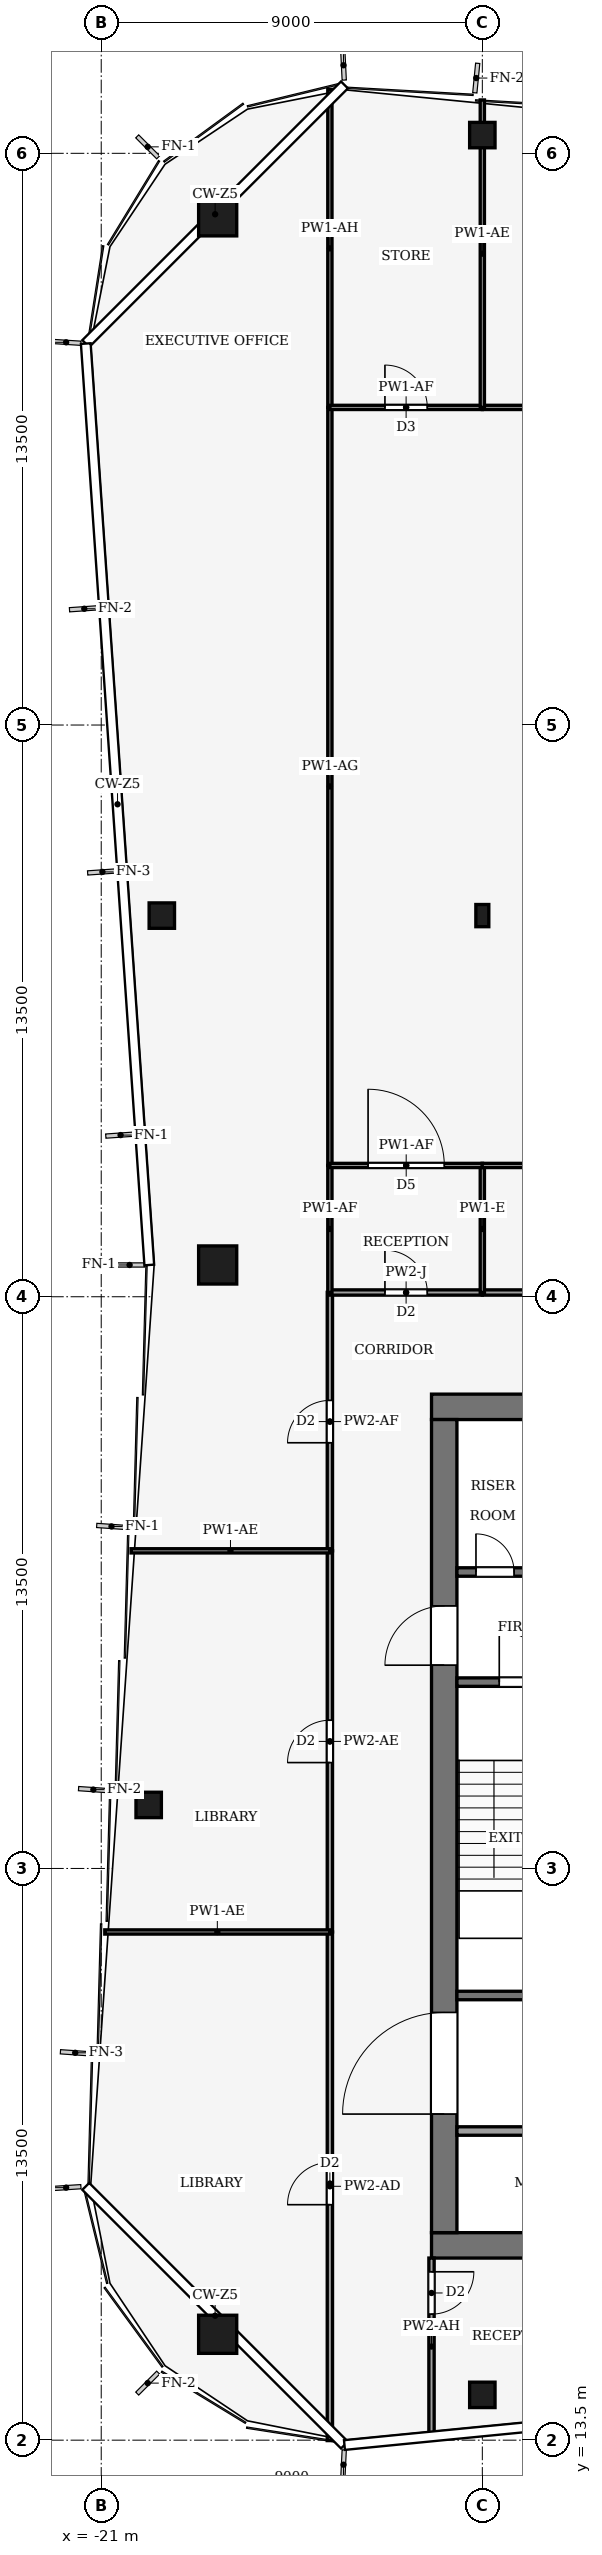
"""IFC4 building model, lengths in metres.
Left out: names, types, materials, properties, quantities, classifications, styles, units other than length and angle.
Written with IfcOpenShell. Run it as: python <this file> out.ifc"""

import sys

from ifc_helpers import new_model, si_unit, direction, frame, frame_2d, origin, origin_2d, place, context, subcontext, project, spatial, rectangle, hollow_rectangle, i_section, extrude, element, fill, save


model = new_model("IFC4")
c1 = context("Model", 3, precision=1e-05, world=origin(), true_north=direction((0.0, 1.0)))
c2 = subcontext(c1, "Body", "Model", "MODEL_VIEW")
j1 = project(units=[si_unit("LENGTHUNIT", "METRE"), si_unit("PLANEANGLEUNIT", "RADIAN")], contexts=[c1])
p1 = place(None, origin())
s1 = spatial("IfcSite", under=j1, at=p1, CompositionType="ELEMENT")
p2 = place(p1, origin())
s2 = spatial("IfcBuilding", under=s1, at=p2, CompositionType="ELEMENT")
p3 = place(p2, frame((0.0, 0.0, 330.0)))
s3 = spatial("IfcBuildingStorey", under=s2, at=p3, CompositionType="ELEMENT", Elevation=330.0)
for number, where, z_axis, x_axis in (
    (1, (-13.2, 18.1, -0.13), (0.0, 0.0, 1.0), (1.0, 0.0, 0.0)),
    (2, (-13.2, 37.9, -0.13), (0.0, 0.0, 1.0), (1.0, 0.0, 0.0)),
):
    element("IfcWall", number, at=place(p3, frame(where, z_axis=z_axis, x_axis=x_axis)), inside=s3, PredefinedType="SHEAR", context=c2, shape_type="SweptSolid", body=[
        extrude(rectangle(XDim=26.4, YDim=0.6, at=frame_2d((13.2, 0.0))), origin(), (0.0, 0.0, 1.0), 3.95),
    ])
p4 = place(p3, frame((-12.9, 18.4, -0.13), z_axis=(0.0, 0.0, 1.0), x_axis=(0.0, 1.0, 0.0)))
e3 = element("IfcWall", 3, at=p4, inside=s3, PredefinedType="SHEAR", context=c2, shape_type="SweptSolid", body=[
    extrude(rectangle(XDim=19.2, YDim=0.6, at=frame_2d((9.6, 0.0))), origin(), (0.0, 0.0, 1.0), 3.95),
])
p5 = place(p4, frame((2.8, 0.0, 0.13)))
e4 = element("IfcOpeningElement", 4, at=p5, cuts=e3, PredefinedType="OPENING", context=c2, shape_type="SweptSolid", body=[
    extrude(rectangle(XDim=2.4, YDim=2.4, at=frame_2d((1.2, 1.2))), frame((0.0, 0.31, 0.0), z_axis=(0.0, -1.0, 0.0), x_axis=(1.0, 0.0, 0.0)), (0.0, 0.0, 1.0), 0.62),
])
p6 = place(p4, frame((13.4, 0.0, 0.13)))
e5 = element("IfcOpeningElement", 5, at=p6, cuts=e3, PredefinedType="OPENING", context=c2, shape_type="SweptSolid", body=[
    extrude(rectangle(XDim=1.4, YDim=2.2, at=frame_2d((0.7, 1.1))), frame((0.0, 0.31, 0.0), z_axis=(0.0, -1.0, 0.0), x_axis=(1.0, 0.0, 0.0)), (0.0, 0.0, 1.0), 0.62),
])
for number, where, z_axis, x_axis in (
    (6, (-18.25, 66.0, 0.0), (0.0, 0.0, 1.0), (1.0, 0.0, 0.0)),
    (7, (-18.25, 16.0, 0.0), (0.0, 0.0, 1.0), (1.0, 0.0, 0.0)),
    (8, (-18.25, 41.25, 0.0), (0.0, 0.0, 1.0), (1.0, 0.0, 0.0)),
):
    element("IfcColumn", number, at=place(p3, frame(where, z_axis=z_axis, x_axis=x_axis)), inside=s3, PredefinedType="COLUMN", context=c2, shape_type="SweptSolid", body=[
        extrude(hollow_rectangle(XDim=0.9, YDim=0.9, WallThickness=0.04, at=origin_2d()), origin(), (0.0, 0.0, 1.0), 4.0),
    ])
for number, where, z_axis, x_axis in (
    (9, (-12.0, 67.93, 0.0), (0.0, 0.0, 1.0), (1.0, 0.0, 0.0)),
    (10, (-12.0, 14.57, 0.0), (0.0, 0.0, 1.0), (1.0, 0.0, 0.0)),
    (11, (-19.879, 28.5, 0.0), (0.0, 0.0, 1.0), (1.0, 0.0, 0.0)),
    (12, (-19.569, 49.5, 0.0), (0.0, 0.0, 1.0), (1.0, 0.0, 0.0)),
):
    element("IfcColumn", number, at=place(p3, frame(where, z_axis=z_axis, x_axis=x_axis)), inside=s3, PredefinedType="COLUMN", context=c2, shape_type="SweptSolid", body=[
        extrude(hollow_rectangle(XDim=0.6, YDim=0.6, WallThickness=0.025, at=origin_2d()), origin(), (0.0, 0.0, 1.0), 4.0),
    ])
p7 = place(p3, frame((-12.0, 49.5, 0.0), z_axis=(0.0, 0.0, 1.0), x_axis=(1.0, 0.0, 0.0)))
e13 = element("IfcColumn", 13, at=p7, inside=s3, PredefinedType="COLUMN", context=c2, shape_type="SweptSolid", body=[
    extrude(i_section(OverallWidth=0.306, OverallDepth=0.524, WebThickness=0.012, FlangeThickness=0.04, FilletRadius=0.027, at=origin_2d()), origin(), (0.0, 0.0, 1.0), 4.0),
])
p8 = place(p3, frame((-12.6, 20.8, 0.0), z_axis=(0.0, 0.0, 1.0), x_axis=(1.0, 0.0, 0.0)))
e14 = element("IfcWall", 14, at=p8, inside=s3, PredefinedType="PARTITIONING", context=c2, shape_type="SweptSolid", body=[
    extrude(rectangle(XDim=6.6, YDim=0.2, at=frame_2d((3.3, 0.0))), origin(), (0.0, 0.0, 1.0), 3.82),
])
p9 = place(p8, frame((1.81, 0.0, 0.0)))
e15 = element("IfcOpeningElement", 15, at=p9, cuts=e14, PredefinedType="OPENING", context=c2, shape_type="SweptSolid", body=[
    extrude(rectangle(XDim=1.0, YDim=2.1, at=frame_2d((0.5, 1.05))), frame((0.0, 0.11, 0.0), z_axis=(0.0, -1.0, 0.0), x_axis=(1.0, 0.0, 0.0)), (0.0, 0.0, 1.0), 0.22),
])
p10 = place(p8, frame((5.11, 0.0, 0.0)))
e16 = element("IfcOpeningElement", 16, at=p10, cuts=e14, PredefinedType="OPENING", context=c2, shape_type="SweptSolid", body=[
    extrude(rectangle(XDim=1.0, YDim=2.1, at=frame_2d((0.5, 1.05))), frame((0.0, 0.11, 0.0), z_axis=(0.0, -1.0, 0.0), x_axis=(1.0, 0.0, 0.0)), (0.0, 0.0, 1.0), 0.22),
])
p11 = place(p3, frame((-12.6, 24.0, 0.0), z_axis=(0.0, 0.0, 1.0), x_axis=(1.0, 0.0, 0.0)))
e17 = element("IfcWall", 17, at=p11, inside=s3, PredefinedType="PARTITIONING", context=c2, shape_type="SweptSolid", body=[
    extrude(rectangle(XDim=6.6, YDim=0.2, at=frame_2d((3.3, 0.0))), origin(), (0.0, 0.0, 1.0), 3.82),
])
p12 = place(p11, frame((4.07, 0.0, 0.0)))
e18 = element("IfcOpeningElement", 18, at=p12, cuts=e17, PredefinedType="OPENING", context=c2, shape_type="SweptSolid", body=[
    extrude(rectangle(XDim=1.0, YDim=2.1, at=frame_2d((0.5, 1.05))), frame((0.0, 0.11, 0.0), z_axis=(0.0, -1.0, 0.0), x_axis=(1.0, 0.0, 0.0)), (0.0, 0.0, 1.0), 0.22),
])
p13 = place(p11, frame((5.57, 0.0, 0.0)))
e19 = element("IfcOpeningElement", 19, at=p13, cuts=e17, PredefinedType="OPENING", context=c2, shape_type="SweptSolid", body=[
    extrude(rectangle(XDim=0.8, YDim=2.1, at=frame_2d((0.4, 1.05))), frame((0.0, 0.11, 0.0), z_axis=(0.0, -1.0, 0.0), x_axis=(1.0, 0.0, 0.0)), (0.0, 0.0, 1.0), 0.22),
])
p14 = place(p3, frame((-12.6, 31.4, 0.0), z_axis=(0.0, 0.0, 1.0), x_axis=(1.0, 0.0, 0.0)))
e20 = element("IfcWall", 20, at=p14, inside=s3, PredefinedType="PARTITIONING", context=c2, shape_type="SweptSolid", body=[
    extrude(rectangle(XDim=6.6, YDim=0.2, at=frame_2d((3.3, 0.0))), origin(), (0.0, 0.0, 1.0), 3.82),
])
p15 = place(p14, frame((1.0, 0.0, 0.0)))
e21 = element("IfcOpeningElement", 21, at=p15, cuts=e20, PredefinedType="OPENING", context=c2, shape_type="SweptSolid", body=[
    extrude(rectangle(XDim=1.2, YDim=2.2, at=frame_2d((0.6, 1.1))), frame((0.0, 0.11, 0.0), z_axis=(0.0, -1.0, 0.0), x_axis=(1.0, 0.0, 0.0)), (0.0, 0.0, 1.0), 0.22),
])
p16 = place(p3, frame((-12.6, 34.0, 0.0), z_axis=(0.0, 0.0, 1.0), x_axis=(1.0, 0.0, 0.0)))
e22 = element("IfcWall", 22, at=p16, inside=s3, PredefinedType="PARTITIONING", context=c2, shape_type="SweptSolid", body=[
    extrude(rectangle(XDim=6.6, YDim=0.2, at=frame_2d((3.3, 0.0))), origin(), (0.0, 0.0, 1.0), 3.82),
])
p17 = place(p16, frame((4.7, 0.0, 0.0)))
e23 = element("IfcOpeningElement", 23, at=p17, cuts=e22, PredefinedType="OPENING", context=c2, shape_type="SweptSolid", body=[
    extrude(rectangle(XDim=1.4, YDim=2.2, at=frame_2d((0.7, 1.1))), frame((0.0, 0.11, 0.0), z_axis=(0.0, -1.0, 0.0), x_axis=(1.0, 0.0, 0.0)), (0.0, 0.0, 1.0), 0.22),
])
p18 = place(p16, frame((2.3, 0.0, 0.0)))
e24 = element("IfcOpeningElement", 24, at=p18, cuts=e22, PredefinedType="OPENING", context=c2, shape_type="SweptSolid", body=[
    extrude(rectangle(XDim=1.4, YDim=2.2, at=frame_2d((0.7, 1.1))), frame((0.0, 0.11, 0.0), z_axis=(0.0, -1.0, 0.0), x_axis=(1.0, 0.0, 0.0)), (0.0, 0.0, 1.0), 0.22),
])
p19 = place(p16, frame((0.45, 0.0, 0.0)))
e25 = element("IfcOpeningElement", 25, at=p19, cuts=e22, PredefinedType="OPENING", context=c2, shape_type="SweptSolid", body=[
    extrude(rectangle(XDim=0.9, YDim=2.1, at=frame_2d((0.45, 1.05))), frame((0.0, 0.11, 0.0), z_axis=(0.0, -1.0, 0.0), x_axis=(1.0, 0.0, 0.0)), (0.0, 0.0, 1.0), 0.22),
])
p20 = place(p3, frame((-15.6, 13.49, 0.0), z_axis=(0.0, 0.0, 1.0), x_axis=(0.0, 1.0, 0.0)))
e26 = element("IfcWall", 26, at=p20, inside=s3, PredefinedType="PARTITIONING", context=c2, shape_type="SweptSolid", body=[
    extrude(rectangle(XDim=12.01, YDim=0.125, at=frame_2d((6.005, 0.0))), origin(), (0.0, 0.0, 1.0), 2.88),
])
p21 = place(p20, frame((5.571, 0.0, 0.0)))
e27 = element("IfcOpeningElement", 27, at=p21, cuts=e26, PredefinedType="OPENING", context=c2, shape_type="SweptSolid", body=[
    extrude(rectangle(XDim=1.0, YDim=2.1, at=frame_2d((0.5, 1.05))), frame((0.0, 0.073, 0.0), z_axis=(0.0, -1.0, 0.0), x_axis=(1.0, 0.0, 0.0)), (0.0, 0.0, 1.0), 0.145),
])
p22 = place(p3, frame((-15.6, 25.5, 0.0), z_axis=(0.0, 0.0, 1.0), x_axis=(0.0, 1.0, 0.0)))
e28 = element("IfcWall", 28, at=p22, inside=s3, PredefinedType="PARTITIONING", context=c2, shape_type="SweptSolid", body=[
    extrude(rectangle(XDim=9.0, YDim=0.125, at=frame_2d((4.5, 0.0))), origin(), (0.0, 0.0, 1.0), 3.49),
])
p23 = place(p22, frame((4.0, 0.0, 0.0)))
e29 = element("IfcOpeningElement", 29, at=p23, cuts=e28, PredefinedType="OPENING", context=c2, shape_type="SweptSolid", body=[
    extrude(rectangle(XDim=1.0, YDim=2.1, at=frame_2d((0.5, 1.05))), frame((0.0, 0.073, 0.0), z_axis=(0.0, -1.0, 0.0), x_axis=(1.0, 0.0, 0.0)), (0.0, 0.0, 1.0), 0.145),
])
p24 = place(p3, frame((-15.6, 34.5, 0.0), z_axis=(0.0, 0.0, 1.0), x_axis=(0.0, 1.0, 0.0)))
e30 = element("IfcWall", 30, at=p24, inside=s3, PredefinedType="PARTITIONING", context=c2, shape_type="SweptSolid", body=[
    extrude(rectangle(XDim=6.104, YDim=0.125, at=frame_2d((3.052, 0.0))), origin(), (0.0, 0.0, 1.0), 3.09),
])
p25 = place(p24, frame((2.552, 0.0, 0.0)))
e31 = element("IfcOpeningElement", 31, at=p25, cuts=e30, PredefinedType="OPENING", context=c2, shape_type="SweptSolid", body=[
    extrude(rectangle(XDim=1.0, YDim=2.1, at=frame_2d((0.5, 1.05))), frame((0.0, 0.073, 0.0), z_axis=(0.0, -1.0, 0.0), x_axis=(1.0, 0.0, 0.0)), (0.0, 0.0, 1.0), 0.145),
])
p26 = place(p3, frame((-13.2, 17.8, 0.0), z_axis=(0.0, 0.0, 1.0), x_axis=(0.0, -1.0, 0.0)))
e32 = element("IfcWall", 32, at=p26, inside=s3, PredefinedType="PARTITIONING", context=c2, shape_type="SweptSolid", body=[
    extrude(rectangle(XDim=4.178, YDim=0.125, at=frame_2d((2.089, 0.0))), origin(), (0.0, 0.0, 1.0), 2.99),
])
p27 = place(p26, frame((0.324, 0.0, 0.0)))
e33 = element("IfcOpeningElement", 33, at=p27, cuts=e32, PredefinedType="OPENING", context=c2, shape_type="SweptSolid", body=[
    extrude(rectangle(XDim=1.0, YDim=2.1, at=frame_2d((0.5, 1.05))), frame((0.0, 0.073, 0.0), z_axis=(0.0, -1.0, 0.0), x_axis=(1.0, 0.0, 0.0)), (0.0, 0.0, 1.0), 0.145),
])
p28 = place(p3, frame((-15.6, 40.6, 0.0), z_axis=(0.0, 0.0, 1.0), x_axis=(1.0, 0.0, 0.0)))
e34 = element("IfcWall", 34, at=p28, inside=s3, PredefinedType="PARTITIONING", context=c2, shape_type="SweptSolid", body=[
    extrude(rectangle(XDim=3.6, YDim=0.125, at=frame_2d((1.8, 0.0))), origin(), (0.0, 0.0, 1.0), 3.34),
])
p29 = place(p28, frame((1.3, 0.0, 0.0)))
e35 = element("IfcOpeningElement", 35, at=p29, cuts=e34, PredefinedType="OPENING", context=c2, shape_type="SweptSolid", body=[
    extrude(rectangle(XDim=1.0, YDim=2.1, at=frame_2d((0.5, 1.05))), frame((0.0, 0.073, 0.0), z_axis=(0.0, -1.0, 0.0), x_axis=(1.0, 0.0, 0.0)), (0.0, 0.0, 1.0), 0.145),
])
p30 = place(p3, frame((-12.0, 40.6, 0.0), z_axis=(0.0, 0.0, 1.0), x_axis=(1.0, 0.0, 0.0)))
e36 = element("IfcWall", 36, at=p30, inside=s3, PredefinedType="PARTITIONING", context=c2, shape_type="SweptSolid", body=[
    extrude(rectangle(XDim=9.0, YDim=0.125, at=frame_2d((4.5, 0.0))), origin(), (0.0, 0.0, 1.0), 3.34),
])
p31 = place(p30, frame((4.0, 0.0, 0.0)))
e37 = element("IfcOpeningElement", 37, at=p31, cuts=e36, PredefinedType="OPENING", context=c2, shape_type="SweptSolid", body=[
    extrude(rectangle(XDim=1.0, YDim=2.1, at=frame_2d((0.5, 1.05))), frame((0.0, 0.073, 0.0), z_axis=(0.0, -1.0, 0.0), x_axis=(1.0, 0.0, 0.0)), (0.0, 0.0, 1.0), 0.145),
])
p32 = place(p3, frame((-15.6, 25.5, 0.0), z_axis=(0.0, 0.0, 1.0), x_axis=(-1.0, 0.0, 0.0)))
e38 = element("IfcWall", 38, at=p32, inside=s3, PredefinedType="PARTITIONING", context=c2, shape_type="SweptSolid", body=[
    extrude(rectangle(XDim=5.316, YDim=0.1, at=frame_2d((2.658, 0.0))), origin(), (0.0, 0.0, 1.0), 2.99),
])
p33 = place(p3, frame((-15.6, 34.5, 0.0), z_axis=(0.0, 0.0, 1.0), x_axis=(-1.0, 0.0, 0.0)))
e39 = element("IfcWall", 39, at=p33, inside=s3, PredefinedType="PARTITIONING", context=c2, shape_type="SweptSolid", body=[
    extrude(rectangle(XDim=4.695, YDim=0.1, at=frame_2d((2.348, 0.0))), origin(), (0.0, 0.0, 1.0), 2.99),
])
p34 = place(p3, frame((-15.6, 40.6, 0.0), z_axis=(0.0, 0.0, 1.0), x_axis=(0.0, 1.0, 0.0)))
e40 = element("IfcWall", 40, at=p34, inside=s3, PredefinedType="PARTITIONING", context=c2, shape_type="SweptSolid", body=[
    extrude(rectangle(XDim=3.0, YDim=0.1, at=frame_2d((1.5, 0.0))), origin(), (0.0, 0.0, 1.0), 3.82),
])
p35 = place(p3, frame((-15.6, 43.6, 0.0), z_axis=(0.0, 0.0, 1.0), x_axis=(0.0, 1.0, 0.0)))
e41 = element("IfcWall", 41, at=p35, inside=s3, PredefinedType="PARTITIONING", context=c2, shape_type="SweptSolid", body=[
    extrude(rectangle(XDim=17.9, YDim=0.1, at=frame_2d((8.95, 0.0))), origin(), (0.0, 0.0, 1.0), 3.3),
])
p36 = place(p3, frame((-15.6, 61.5, 0.0), z_axis=(0.0, 0.0, 1.0), x_axis=(0.0, 1.0, 0.0)))
e42 = element("IfcWall", 42, at=p36, inside=s3, PredefinedType="PARTITIONING", context=c2, shape_type="SweptSolid", body=[
    extrude(rectangle(XDim=7.51, YDim=0.1, at=frame_2d((3.755, 0.0))), origin(), (0.0, 0.0, 1.0), 2.88),
])
p37 = place(p3, frame((-12.0, 40.6, 0.0), z_axis=(0.0, 0.0, 1.0), x_axis=(0.0, 1.0, 0.0)))
e43 = element("IfcWall", 43, at=p37, inside=s3, PredefinedType="PARTITIONING", context=c2, shape_type="SweptSolid", body=[
    extrude(rectangle(XDim=3.0, YDim=0.1, at=frame_2d((1.5, 0.0))), origin(), (0.0, 0.0, 1.0), 3.34),
])
p38 = place(p3, frame((-15.6, 43.6, 0.0), z_axis=(0.0, 0.0, 1.0), x_axis=(1.0, 0.0, 0.0)))
e44 = element("IfcWall", 44, at=p38, inside=s3, PredefinedType="PARTITIONING", context=c2, shape_type="SweptSolid", body=[
    extrude(rectangle(XDim=3.604, YDim=0.1, at=frame_2d((1.802, 0.0))), origin(), (0.0, 0.0, 1.0), 3.82),
])
p39 = place(p38, frame((0.902, 0.0, 0.0)))
e45 = element("IfcOpeningElement", 45, at=p39, cuts=e44, PredefinedType="OPENING", context=c2, shape_type="SweptSolid", body=[
    extrude(rectangle(XDim=1.8, YDim=2.1, at=frame_2d((0.9, 1.05))), frame((0.0, 0.06, 0.0), z_axis=(0.0, -1.0, 0.0), x_axis=(1.0, 0.0, 0.0)), (0.0, 0.0, 1.0), 0.12),
])
p40 = place(p3, frame((-2.996, 43.6, 0.0), z_axis=(0.0, 0.0, 1.0), x_axis=(-1.0, 0.0, 0.0)))
e46 = element("IfcWall", 46, at=p40, inside=s3, PredefinedType="PARTITIONING", context=c2, shape_type="SweptSolid", body=[
    extrude(rectangle(XDim=9.008, YDim=0.1, at=frame_2d((4.504, 0.0))), origin(), (0.0, 0.0, 1.0), 3.34),
])
p41 = place(p3, frame((-15.6, 61.5, 0.0), z_axis=(0.0, 0.0, 1.0), x_axis=(1.0, 0.0, 0.0)))
e47 = element("IfcWall", 47, at=p41, inside=s3, PredefinedType="PARTITIONING", context=c2, shape_type="SweptSolid", body=[
    extrude(rectangle(XDim=3.6, YDim=0.1, at=frame_2d((1.8, 0.0))), origin(), (0.0, 0.0, 1.0), 3.82),
])
p42 = place(p41, frame((1.3, 0.0, 0.0)))
e48 = element("IfcOpeningElement", 48, at=p42, cuts=e47, PredefinedType="OPENING", context=c2, shape_type="SweptSolid", body=[
    extrude(rectangle(XDim=1.0, YDim=2.1, at=frame_2d((0.5, 1.05))), frame((0.0, 0.06, 0.0), z_axis=(0.0, -1.0, 0.0), x_axis=(1.0, 0.0, 0.0)), (0.0, 0.0, 1.0), 0.12),
])
p43 = place(p3, frame((-12.0, 61.5, 0.0), z_axis=(0.0, 0.0, 1.0), x_axis=(1.0, 0.0, 0.0)))
e49 = element("IfcWall", 49, at=p43, inside=s3, PredefinedType="PARTITIONING", context=c2, shape_type="SweptSolid", body=[
    extrude(rectangle(XDim=9.0, YDim=0.1, at=frame_2d((4.5, 0.0))), origin(), (0.0, 0.0, 1.0), 3.19),
])
p44 = place(p43, frame((4.0, 0.0, 0.0)))
e50 = element("IfcOpeningElement", 50, at=p44, cuts=e49, PredefinedType="OPENING", context=c2, shape_type="SweptSolid", body=[
    extrude(rectangle(XDim=1.0, YDim=2.1, at=frame_2d((0.5, 1.05))), frame((0.0, 0.06, 0.0), z_axis=(0.0, -1.0, 0.0), x_axis=(1.0, 0.0, 0.0)), (0.0, 0.0, 1.0), 0.12),
])
p45 = place(p3, frame((-12.0, 61.5, 0.0), z_axis=(0.0, 0.0, 1.0), x_axis=(0.0, 1.0, 0.0)))
e51 = element("IfcWall", 51, at=p45, inside=s3, PredefinedType="PARTITIONING", context=c2, shape_type="SweptSolid", body=[
    extrude(rectangle(XDim=7.26, YDim=0.1, at=frame_2d((3.63, 0.0))), origin(), (0.0, 0.0, 1.0), 2.99),
])
p46 = place(p19, origin())
e52 = element("IfcDoor", 52, at=p46, inside=s3, OperationType="SINGLE_SWING_RIGHT", PredefinedType="DOOR", context=c2, shape_type="SweptSolid", body=[
    extrude(rectangle(XDim=0.9, YDim=2.1, at=frame_2d((0.45, 1.05))), frame((0.0, 0.025, 0.0), z_axis=(0.0, -1.0, 0.0), x_axis=(1.0, 0.0, 0.0)), (0.0, 0.0, 1.0), 0.05),
])
fill(e25, e52)
p47 = place(p15, origin())
e53 = element("IfcDoor", 53, at=p47, inside=s3, OperationType="SINGLE_SWING_RIGHT", PredefinedType="DOOR", context=c2, shape_type="SweptSolid", body=[
    extrude(rectangle(XDim=1.2, YDim=2.2, at=frame_2d((0.6, 1.1))), frame((0.0, 0.025, 0.0), z_axis=(0.0, -1.0, 0.0), x_axis=(1.0, 0.0, 0.0)), (0.0, 0.0, 1.0), 0.05),
])
fill(e21, e53)
p48 = place(p5, origin())
e54 = element("IfcDoor", 54, at=p48, inside=s3, OperationType="DOUBLE_DOOR_SINGLE_SWING", PredefinedType="DOOR", context=c2, shape_type="SweptSolid", body=[
    extrude(rectangle(XDim=2.4, YDim=2.4, at=frame_2d((1.2, 1.2))), frame((0.0, 0.025, 0.0), z_axis=(0.0, -1.0, 0.0), x_axis=(1.0, 0.0, 0.0)), (0.0, 0.0, 1.0), 0.05),
])
fill(e4, e54)
p49 = place(p6, origin())
e55 = element("IfcDoor", 55, at=p49, inside=s3, OperationType="SINGLE_SWING_RIGHT", PredefinedType="DOOR", context=c2, shape_type="SweptSolid", body=[
    extrude(rectangle(XDim=1.4, YDim=2.2, at=frame_2d((0.7, 1.1))), frame((0.0, 0.025, 0.0), z_axis=(0.0, -1.0, 0.0), x_axis=(1.0, 0.0, 0.0)), (0.0, 0.0, 1.0), 0.05),
])
fill(e5, e55)
p50 = place(p21, origin())
e56 = element("IfcDoor", 56, at=p50, inside=s3, OperationType="SINGLE_SWING_RIGHT", PredefinedType="DOOR", context=c2, shape_type="SweptSolid", body=[
    extrude(rectangle(XDim=1.0, YDim=2.1, at=frame_2d((0.5, 1.05))), frame((0.0, 0.025, 0.0), z_axis=(0.0, -1.0, 0.0), x_axis=(1.0, 0.0, 0.0)), (0.0, 0.0, 1.0), 0.05),
])
fill(e27, e56)
p51 = place(p23, origin())
e57 = element("IfcDoor", 57, at=p51, inside=s3, OperationType="SINGLE_SWING_RIGHT", PredefinedType="DOOR", context=c2, shape_type="SweptSolid", body=[
    extrude(rectangle(XDim=1.0, YDim=2.1, at=frame_2d((0.5, 1.05))), frame((0.0, 0.025, 0.0), z_axis=(0.0, -1.0, 0.0), x_axis=(1.0, 0.0, 0.0)), (0.0, 0.0, 1.0), 0.05),
])
fill(e29, e57)
p52 = place(p25, origin())
e58 = element("IfcDoor", 58, at=p52, inside=s3, OperationType="SINGLE_SWING_LEFT", PredefinedType="DOOR", context=c2, shape_type="SweptSolid", body=[
    extrude(rectangle(XDim=1.0, YDim=2.1, at=frame_2d((0.5, 1.05))), frame((0.0, 0.025, 0.0), z_axis=(0.0, -1.0, 0.0), x_axis=(1.0, 0.0, 0.0)), (0.0, 0.0, 1.0), 0.05),
])
fill(e31, e58)
p53 = place(p27, origin())
e59 = element("IfcDoor", 59, at=p53, inside=s3, OperationType="SINGLE_SWING_LEFT", PredefinedType="DOOR", context=c2, shape_type="SweptSolid", body=[
    extrude(rectangle(XDim=1.0, YDim=2.1, at=frame_2d((0.5, 1.05))), frame((0.0, 0.025, 0.0), z_axis=(0.0, -1.0, 0.0), x_axis=(1.0, 0.0, 0.0)), (0.0, 0.0, 1.0), 0.05),
])
fill(e33, e59)
p54 = place(p29, origin())
e60 = element("IfcDoor", 60, at=p54, inside=s3, OperationType="SINGLE_SWING_LEFT", PredefinedType="DOOR", context=c2, shape_type="SweptSolid", body=[
    extrude(rectangle(XDim=1.0, YDim=2.1, at=frame_2d((0.5, 1.05))), frame((0.0, 0.025, 0.0), z_axis=(0.0, -1.0, 0.0), x_axis=(1.0, 0.0, 0.0)), (0.0, 0.0, 1.0), 0.05),
])
fill(e35, e60)
p55 = place(p39, origin())
e61 = element("IfcDoor", 61, at=p55, inside=s3, OperationType="DOUBLE_DOOR_SINGLE_SWING", PredefinedType="DOOR", context=c2, shape_type="SweptSolid", body=[
    extrude(rectangle(XDim=1.8, YDim=2.1, at=frame_2d((0.9, 1.05))), frame((0.0, 0.025, 0.0), z_axis=(0.0, -1.0, 0.0), x_axis=(1.0, 0.0, 0.0)), (0.0, 0.0, 1.0), 0.05),
])
fill(e45, e61)
p56 = place(p42, origin())
e62 = element("IfcDoor", 62, at=p56, inside=s3, OperationType="SINGLE_SWING_LEFT", PredefinedType="DOOR", context=c2, shape_type="SweptSolid", body=[
    extrude(rectangle(XDim=1.0, YDim=2.1, at=frame_2d((0.5, 1.05))), frame((0.0, 0.025, 0.0), z_axis=(0.0, -1.0, 0.0), x_axis=(1.0, 0.0, 0.0)), (0.0, 0.0, 1.0), 0.05),
])
fill(e48, e62)
save(model, sys.argv[1])
